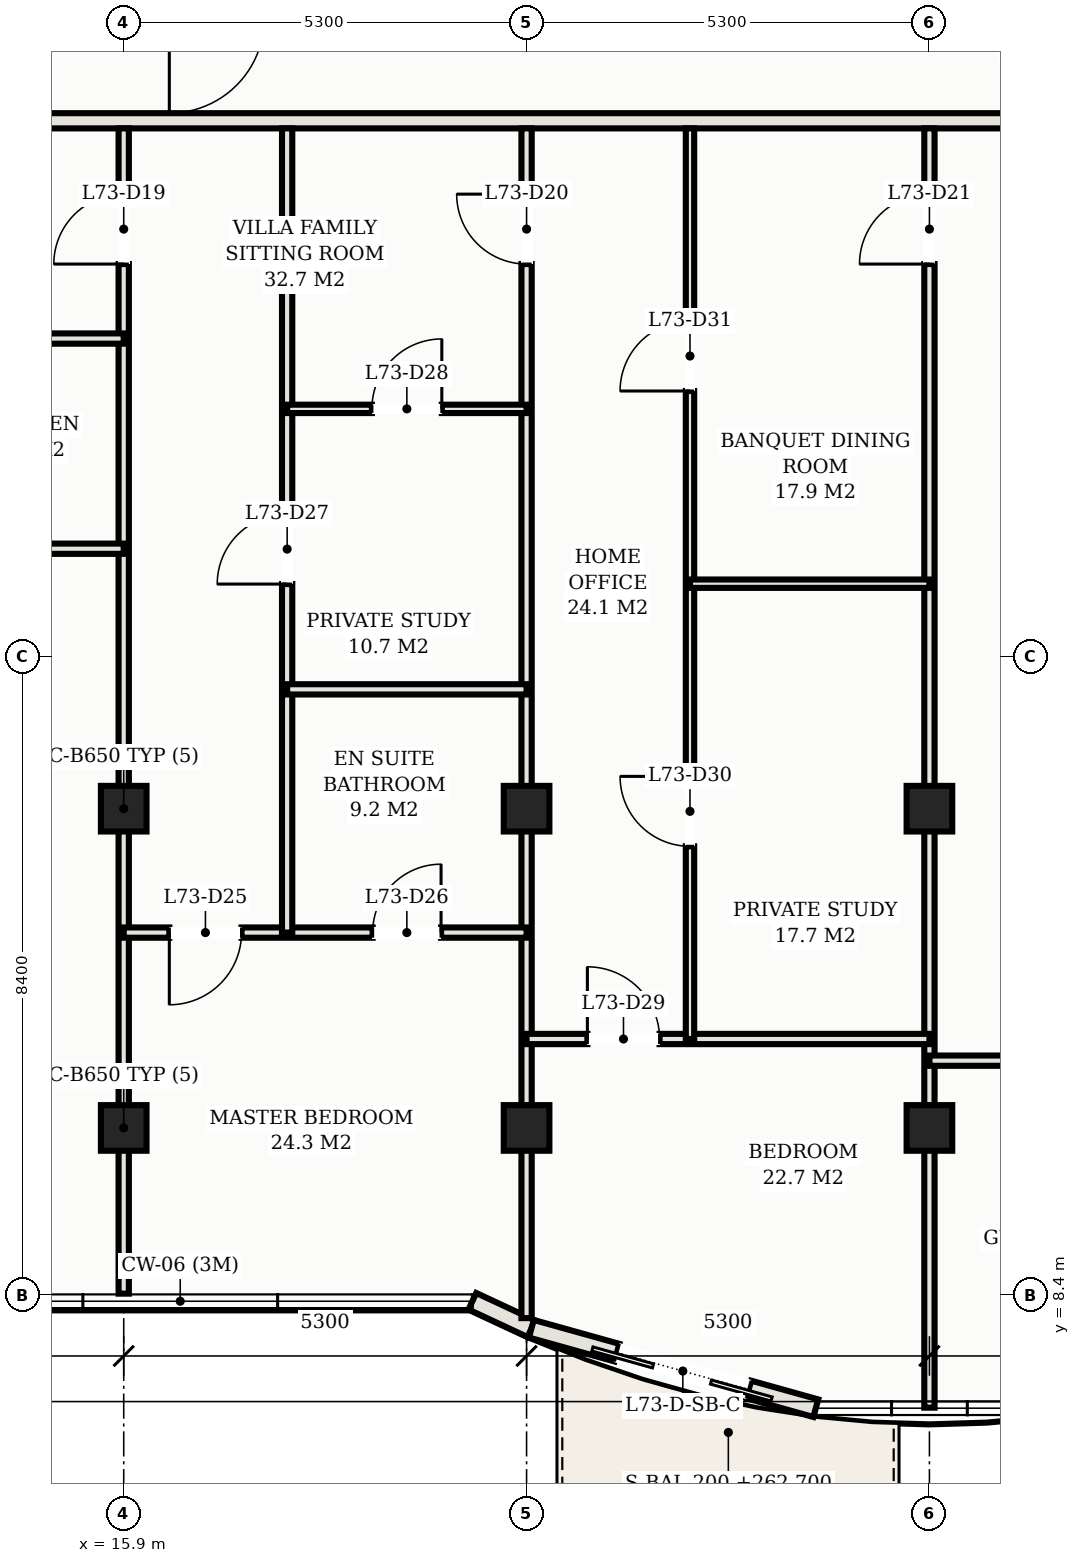
"""IFC4 building model, lengths in metres.
Left out: names, types, materials, properties, quantities, classifications, styles, units other than length and angle.
Written with IfcOpenShell. Run it as: python <this file> out.ifc"""

import sys

from ifc_helpers import new_model, si_unit, direction, frame, frame_2d, origin, origin_2d, place, context, subcontext, project, spatial, rectangle, hollow_rectangle, extrude, element, fill, save


model = new_model("IFC4")
c1 = context("Model", 3, precision=1e-05, world=origin(), true_north=direction((0.0, 1.0)))
c2 = subcontext(c1, "Body", "Model", "MODEL_VIEW")
j1 = project(units=[si_unit("LENGTHUNIT", "METRE"), si_unit("PLANEANGLEUNIT", "RADIAN")], contexts=[c1])
p1 = place(None, origin())
s1 = spatial("IfcSite", under=j1, at=p1, CompositionType="ELEMENT")
p2 = place(p1, origin())
s2 = spatial("IfcBuilding", under=s1, at=p2, CompositionType="ELEMENT")
p3 = place(p2, frame((0.0, 0.0, 262.7)))
s3 = spatial("IfcBuildingStorey", under=s2, at=p3, CompositionType="ELEMENT", Elevation=262.7)
p4 = place(p3, frame((15.9, 14.8, 0.0), z_axis=(0.0, 0.0, 1.0), x_axis=(1.0, 0.0, 0.0)))
e1 = element("IfcColumn", 1, at=p4, inside=s3, PredefinedType="COLUMN", context=c2, shape_type="SweptSolid", body=[
    extrude(hollow_rectangle(XDim=0.6, YDim=0.6, WallThickness=0.022, at=origin_2d()), origin(), (0.0, 0.0, 1.0), 3.3),
])
p5 = place(p3, frame((15.9, 10.6, 0.0), z_axis=(0.0, 0.0, 1.0), x_axis=(1.0, 0.0, 0.0)))
e2 = element("IfcColumn", 2, at=p5, inside=s3, PredefinedType="COLUMN", context=c2, shape_type="SweptSolid", body=[
    extrude(hollow_rectangle(XDim=0.6, YDim=0.6, WallThickness=0.022, at=origin_2d()), origin(), (0.0, 0.0, 1.0), 3.264),
])
p6 = place(p3, frame((21.2, 14.8, 0.0), z_axis=(0.0, 0.0, 1.0), x_axis=(1.0, 0.0, 0.0)))
e3 = element("IfcColumn", 3, at=p6, inside=s3, PredefinedType="COLUMN", context=c2, shape_type="SweptSolid", body=[
    extrude(hollow_rectangle(XDim=0.6, YDim=0.6, WallThickness=0.022, at=origin_2d()), origin(), (0.0, 0.0, 1.0), 3.3),
])
p7 = place(p3, frame((21.2, 10.6, 0.0), z_axis=(0.0, 0.0, 1.0), x_axis=(1.0, 0.0, 0.0)))
e4 = element("IfcColumn", 4, at=p7, inside=s3, PredefinedType="COLUMN", context=c2, shape_type="SweptSolid", body=[
    extrude(hollow_rectangle(XDim=0.6, YDim=0.6, WallThickness=0.022, at=origin_2d()), origin(), (0.0, 0.0, 1.0), 3.264),
])
p8 = place(p3, frame((26.5, 14.8, 0.0), z_axis=(0.0, 0.0, 1.0), x_axis=(1.0, 0.0, 0.0)))
e5 = element("IfcColumn", 5, at=p8, inside=s3, PredefinedType="COLUMN", context=c2, shape_type="SweptSolid", body=[
    extrude(hollow_rectangle(XDim=0.6, YDim=0.6, WallThickness=0.022, at=origin_2d()), origin(), (0.0, 0.0, 1.0), 3.3),
])
p9 = place(p3, frame((26.5, 10.6, 0.0), z_axis=(0.0, 0.0, 1.0), x_axis=(1.0, 0.0, 0.0)))
e6 = element("IfcColumn", 6, at=p9, inside=s3, PredefinedType="COLUMN", context=c2, shape_type="SweptSolid", body=[
    extrude(hollow_rectangle(XDim=0.6, YDim=0.6, WallThickness=0.022, at=origin_2d()), origin(), (0.0, 0.0, 1.0), 3.264),
])
p10 = place(p3, frame((20.487, 8.32, 0.0), z_axis=(0.0, 0.0, 1.0), x_axis=(0.906190424584, -0.422869855147, 0.0)))
e7 = element("IfcWall", 7, at=p10, inside=s3, PredefinedType="SOLIDWALL", context=c2, shape_type="SweptSolid", body=[
    extrude(rectangle(XDim=0.856, YDim=0.24, at=frame_2d((0.428, 0.0))), origin(), (0.0, 0.0, 1.0), 3.04),
])
p11 = place(p3, frame((21.263, 7.958, 0.0), z_axis=(0.0, 0.0, 1.0), x_axis=(0.963152398068, -0.268956238255, 0.0)))
e8 = element("IfcWall", 8, at=p11, inside=s3, PredefinedType="SOLIDWALL", context=c2, shape_type="SweptSolid", body=[
    extrude(rectangle(XDim=3.885, YDim=0.24, at=frame_2d((1.942, 0.0))), origin(), (0.0, 0.0, 1.0), 3.04),
])
p12 = place(p11, frame((1.169, 0.0, 0.0)))
e9 = element("IfcOpeningElement", 9, at=p12, cuts=e8, PredefinedType="OPENING", context=c2, shape_type="SweptSolid", body=[
    extrude(rectangle(XDim=1.8, YDim=2.2, at=frame_2d((0.9, 1.1))), frame((0.0, 0.13, 0.0), z_axis=(0.0, -1.0, 0.0), x_axis=(1.0, 0.0, 0.0)), (0.0, 0.0, 1.0), 0.26),
])
p13 = place(p3, frame((8.6, 23.85, 0.0), z_axis=(0.0, 0.0, 1.0), x_axis=(1.0, 0.0, 0.0)))
e10 = element("IfcWall", 10, at=p13, inside=s3, PredefinedType="PARTITIONING", context=c2, shape_type="SweptSolid", body=[
    extrude(rectangle(XDim=35.8, YDim=0.2, at=frame_2d((17.9, 0.0))), origin(), (0.0, 0.0, 1.0), 2.38),
])
p14 = place(p13, frame((2.625, 0.0, 0.0)))
e11 = element("IfcOpeningElement", 11, at=p14, cuts=e10, PredefinedType="OPENING", context=c2, shape_type="SweptSolid", body=[
    extrude(rectangle(XDim=1.35, YDim=2.26, at=frame_2d((0.675, 1.13))), frame((0.0, 0.11, 0.0), z_axis=(0.0, -1.0, 0.0), x_axis=(1.0, 0.0, 0.0)), (0.0, 0.0, 1.0), 0.22),
])
p15 = place(p13, frame((0.505, 0.0, 0.0)))
e12 = element("IfcOpeningElement", 12, at=p15, cuts=e10, PredefinedType="OPENING", context=c2, shape_type="SweptSolid", body=[
    extrude(rectangle(XDim=0.9, YDim=2.15, at=frame_2d((0.45, 1.075))), frame((0.0, 0.11, 0.0), z_axis=(0.0, -1.0, 0.0), x_axis=(1.0, 0.0, 0.0)), (0.0, 0.0, 1.0), 0.22),
])
p16 = place(p13, frame((34.395, 0.0, 0.0)))
e13 = element("IfcOpeningElement", 13, at=p16, cuts=e10, PredefinedType="OPENING", context=c2, shape_type="SweptSolid", body=[
    extrude(rectangle(XDim=0.9, YDim=2.15, at=frame_2d((0.45, 1.075))), frame((0.0, 0.11, 0.0), z_axis=(0.0, -1.0, 0.0), x_axis=(1.0, 0.0, 0.0)), (0.0, 0.0, 1.0), 0.22),
])
p17 = place(p3, frame((15.9, 8.42, 0.0), z_axis=(0.0, 0.0, 1.0), x_axis=(0.0, 1.0, 0.0)))
e14 = element("IfcWall", 14, at=p17, inside=s3, PredefinedType="PARTITIONING", context=c2, shape_type="SweptSolid", body=[
    extrude(rectangle(XDim=15.33, YDim=0.135, at=frame_2d((7.665, 0.0))), origin(), (0.0, 0.0, 1.0), 2.38),
])
p18 = place(p17, frame((13.545, 0.0, 0.0)))
e15 = element("IfcOpeningElement", 15, at=p18, cuts=e14, PredefinedType="OPENING", context=c2, shape_type="SweptSolid", body=[
    extrude(rectangle(XDim=0.92, YDim=2.15, at=frame_2d((0.46, 1.075))), frame((0.0, 0.078, 0.0), z_axis=(0.0, -1.0, 0.0), x_axis=(1.0, 0.0, 0.0)), (0.0, 0.0, 1.0), 0.155),
])
p19 = place(p3, frame((21.2, 8.098, 0.0), z_axis=(0.0, 0.0, 1.0), x_axis=(0.0, 1.0, 0.0)))
e16 = element("IfcWall", 16, at=p19, inside=s3, PredefinedType="PARTITIONING", context=c2, shape_type="SweptSolid", body=[
    extrude(rectangle(XDim=15.652, YDim=0.135, at=frame_2d((7.826, 0.0))), origin(), (0.0, 0.0, 1.0), 2.38),
])
p20 = place(p19, frame((13.867, 0.0, 0.0)))
e17 = element("IfcOpeningElement", 17, at=p20, cuts=e16, PredefinedType="OPENING", context=c2, shape_type="SweptSolid", body=[
    extrude(rectangle(XDim=0.92, YDim=2.15, at=frame_2d((0.46, 1.075))), frame((0.0, 0.078, 0.0), z_axis=(0.0, -1.0, 0.0), x_axis=(1.0, 0.0, 0.0)), (0.0, 0.0, 1.0), 0.155),
])
p21 = place(p3, frame((26.5, 6.92, 0.0), z_axis=(0.0, 0.0, 1.0), x_axis=(0.0, 1.0, 0.0)))
e18 = element("IfcWall", 18, at=p21, inside=s3, PredefinedType="PARTITIONING", context=c2, shape_type="SweptSolid", body=[
    extrude(rectangle(XDim=16.83, YDim=0.135, at=frame_2d((8.415, 0.0))), origin(), (0.0, 0.0, 1.0), 2.38),
])
p22 = place(p21, frame((15.045, 0.0, 0.0)))
e19 = element("IfcOpeningElement", 19, at=p22, cuts=e18, PredefinedType="OPENING", context=c2, shape_type="SweptSolid", body=[
    extrude(rectangle(XDim=0.92, YDim=2.15, at=frame_2d((0.46, 1.075))), frame((0.0, 0.078, 0.0), z_axis=(0.0, -1.0, 0.0), x_axis=(1.0, 0.0, 0.0)), (0.0, 0.0, 1.0), 0.155),
])
for number, where, z_axis, x_axis in (
    (20, (12.75, 18.22, 0.0), (0.0, 0.0, 1.0), (1.0, 0.0, 0.0)),
    (21, (12.75, 20.985, 0.0), (0.0, 0.0, 1.0), (1.0, 0.0, 0.0)),
):
    element("IfcWall", number, at=place(p3, frame(where, z_axis=z_axis, x_axis=x_axis)), inside=s3, PredefinedType="PARTITIONING", context=c2, shape_type="SweptSolid", body=[
        extrude(rectangle(XDim=3.15, YDim=0.135, at=frame_2d((1.575, 0.0))), origin(), (0.0, 0.0, 1.0), 2.38),
    ])
p23 = place(p3, frame((15.9, 13.17, 0.0), z_axis=(0.0, 0.0, 1.0), x_axis=(1.0, 0.0, 0.0)))
e22 = element("IfcWall", 22, at=p23, inside=s3, PredefinedType="PARTITIONING", context=c2, shape_type="SweptSolid", body=[
    extrude(rectangle(XDim=5.3, YDim=0.135, at=frame_2d((2.65, 0.0))), origin(), (0.0, 0.0, 1.0), 2.38),
])
p24 = place(p23, frame((0.6, 0.0, 0.0)))
e23 = element("IfcOpeningElement", 23, at=p24, cuts=e22, PredefinedType="OPENING", context=c2, shape_type="SweptSolid", body=[
    extrude(rectangle(XDim=0.95, YDim=2.15, at=frame_2d((0.475, 1.075))), frame((0.0, 0.078, 0.0), z_axis=(0.0, -1.0, 0.0), x_axis=(1.0, 0.0, 0.0)), (0.0, 0.0, 1.0), 0.155),
])
p25 = place(p23, frame((3.275, 0.0, 0.0)))
e24 = element("IfcOpeningElement", 24, at=p25, cuts=e22, PredefinedType="OPENING", context=c2, shape_type="SweptSolid", body=[
    extrude(rectangle(XDim=0.9, YDim=2.15, at=frame_2d((0.45, 1.075))), frame((0.0, 0.078, 0.0), z_axis=(0.0, -1.0, 0.0), x_axis=(1.0, 0.0, 0.0)), (0.0, 0.0, 1.0), 0.155),
])
p26 = place(p3, frame((18.05, 13.17, 0.0), z_axis=(0.0, 0.0, 1.0), x_axis=(0.0, 1.0, 0.0)))
e25 = element("IfcWall", 25, at=p26, inside=s3, PredefinedType="PARTITIONING", context=c2, shape_type="SweptSolid", body=[
    extrude(rectangle(XDim=10.58, YDim=0.135, at=frame_2d((5.29, 0.0))), origin(), (0.0, 0.0, 1.0), 2.38),
])
p27 = place(p26, frame((4.585, 0.0, 0.0)))
e26 = element("IfcOpeningElement", 26, at=p27, cuts=e25, PredefinedType="OPENING", context=c2, shape_type="SweptSolid", body=[
    extrude(rectangle(XDim=0.92, YDim=2.15, at=frame_2d((0.46, 1.075))), frame((0.0, 0.078, 0.0), z_axis=(0.0, -1.0, 0.0), x_axis=(1.0, 0.0, 0.0)), (0.0, 0.0, 1.0), 0.155),
])
p28 = place(p3, frame((18.05, 16.37, 0.0), z_axis=(0.0, 0.0, 1.0), x_axis=(1.0, 0.0, 0.0)))
e27 = element("IfcWall", 27, at=p28, inside=s3, PredefinedType="PARTITIONING", context=c2, shape_type="SweptSolid", body=[
    extrude(rectangle(XDim=3.15, YDim=0.135, at=frame_2d((1.575, 0.0))), origin(), (0.0, 0.0, 1.0), 2.38),
])
p29 = place(p3, frame((18.05, 20.06, 0.0), z_axis=(0.0, 0.0, 1.0), x_axis=(1.0, 0.0, 0.0)))
e28 = element("IfcWall", 28, at=p29, inside=s3, PredefinedType="MOVABLE", context=c2, shape_type="SweptSolid", body=[
    extrude(rectangle(XDim=3.15, YDim=0.11, at=frame_2d((1.575, 0.0))), origin(), (0.0, 0.0, 1.0), 2.38),
])
p30 = place(p29, frame((1.115, 0.0, 0.0)))
e29 = element("IfcOpeningElement", 29, at=p30, cuts=e28, PredefinedType="OPENING", context=c2, shape_type="SweptSolid", body=[
    extrude(rectangle(XDim=0.92, YDim=2.15, at=frame_2d((0.46, 1.075))), frame((0.0, 0.065, 0.0), z_axis=(0.0, -1.0, 0.0), x_axis=(1.0, 0.0, 0.0)), (0.0, 0.0, 1.0), 0.13),
])
p31 = place(p3, frame((21.2, 11.77, 0.0), z_axis=(0.0, 0.0, 1.0), x_axis=(1.0, 0.0, 0.0)))
e30 = element("IfcWall", 30, at=p31, inside=s3, PredefinedType="PARTITIONING", context=c2, shape_type="SweptSolid", body=[
    extrude(rectangle(XDim=5.3, YDim=0.135, at=frame_2d((2.65, 0.0))), origin(), (0.0, 0.0, 1.0), 2.38),
])
p32 = place(p31, frame((0.8, 0.0, 0.0)))
e31 = element("IfcOpeningElement", 31, at=p32, cuts=e30, PredefinedType="OPENING", context=c2, shape_type="SweptSolid", body=[
    extrude(rectangle(XDim=0.95, YDim=2.15, at=frame_2d((0.475, 1.075))), frame((0.0, 0.078, 0.0), z_axis=(0.0, -1.0, 0.0), x_axis=(1.0, 0.0, 0.0)), (0.0, 0.0, 1.0), 0.155),
])
p33 = place(p3, frame((23.35, 11.77, 0.0), z_axis=(0.0, 0.0, 1.0), x_axis=(0.0, 1.0, 0.0)))
e32 = element("IfcWall", 32, at=p33, inside=s3, PredefinedType="MOVABLE", context=c2, shape_type="SweptSolid", body=[
    extrude(rectangle(XDim=11.98, YDim=0.11, at=frame_2d((5.99, 0.0))), origin(), (0.0, 0.0, 1.0), 2.38),
])
p34 = place(p33, frame((2.535, 0.0, 0.0)))
e33 = element("IfcOpeningElement", 33, at=p34, cuts=e32, PredefinedType="OPENING", context=c2, shape_type="SweptSolid", body=[
    extrude(rectangle(XDim=0.92, YDim=2.15, at=frame_2d((0.46, 1.075))), frame((0.0, 0.065, 0.0), z_axis=(0.0, -1.0, 0.0), x_axis=(1.0, 0.0, 0.0)), (0.0, 0.0, 1.0), 0.13),
])
p35 = place(p33, frame((8.525, 0.0, 0.0)))
e34 = element("IfcOpeningElement", 34, at=p35, cuts=e32, PredefinedType="OPENING", context=c2, shape_type="SweptSolid", body=[
    extrude(rectangle(XDim=0.92, YDim=2.15, at=frame_2d((0.46, 1.075))), frame((0.0, 0.065, 0.0), z_axis=(0.0, -1.0, 0.0), x_axis=(1.0, 0.0, 0.0)), (0.0, 0.0, 1.0), 0.13),
])
p36 = place(p3, frame((23.35, 17.76, 0.0), z_axis=(0.0, 0.0, 1.0), x_axis=(1.0, 0.0, 0.0)))
e35 = element("IfcWall", 35, at=p36, inside=s3, PredefinedType="MOVABLE", context=c2, shape_type="SweptSolid", body=[
    extrude(rectangle(XDim=3.15, YDim=0.11, at=frame_2d((1.575, 0.0))), origin(), (0.0, 0.0, 1.0), 2.38),
])
p37 = place(p3, frame((26.5, 11.485, 0.0), z_axis=(0.0, 0.0, 1.0), x_axis=(1.0, 0.0, 0.0)))
e36 = element("IfcWall", 36, at=p37, inside=s3, PredefinedType="PARTITIONING", context=c2, shape_type="SweptSolid", body=[
    extrude(rectangle(XDim=9.3, YDim=0.135, at=frame_2d((4.65, 0.0))), origin(), (0.0, 0.0, 1.0), 2.38),
])
p38 = place(p37, frame((2.375, 0.0, 0.0)))
e37 = element("IfcOpeningElement", 37, at=p38, cuts=e36, PredefinedType="OPENING", context=c2, shape_type="SweptSolid", body=[
    extrude(rectangle(XDim=0.95, YDim=2.15, at=frame_2d((0.475, 1.075))), frame((0.0, 0.078, 0.0), z_axis=(0.0, -1.0, 0.0), x_axis=(1.0, 0.0, 0.0)), (0.0, 0.0, 1.0), 0.155),
])
p39 = place(p12, frame((1.8, 0.0, 0.0), z_axis=(0.0, 0.0, 1.0), x_axis=(-1.0, 0.0, 0.0)))
e38 = element("IfcDoor", 38, at=p39, inside=s3, OperationType="DOUBLE_DOOR_SLIDING", PredefinedType="DOOR", context=c2, shape_type="SweptSolid", body=[
    extrude(rectangle(XDim=1.8, YDim=2.2, at=frame_2d((0.9, 1.1))), frame((0.0, 0.025, 0.0), z_axis=(0.0, -1.0, 0.0), x_axis=(1.0, 0.0, 0.0)), (0.0, 0.0, 1.0), 0.05),
])
fill(e9, e38)
p40 = place(p18, origin())
e39 = element("IfcDoor", 39, at=p40, inside=s3, OperationType="SINGLE_SWING_LEFT", PredefinedType="DOOR", context=c2, shape_type="SweptSolid", body=[
    extrude(rectangle(XDim=0.92, YDim=2.15, at=frame_2d((0.46, 1.075))), frame((0.0, 0.025, 0.0), z_axis=(0.0, -1.0, 0.0), x_axis=(1.0, 0.0, 0.0)), (0.0, 0.0, 1.0), 0.05),
])
fill(e15, e39)
p41 = place(p20, origin())
e40 = element("IfcDoor", 40, at=p41, inside=s3, OperationType="SINGLE_SWING_RIGHT", PredefinedType="DOOR", context=c2, shape_type="SweptSolid", body=[
    extrude(rectangle(XDim=0.92, YDim=2.15, at=frame_2d((0.46, 1.075))), frame((0.0, 0.025, 0.0), z_axis=(0.0, -1.0, 0.0), x_axis=(1.0, 0.0, 0.0)), (0.0, 0.0, 1.0), 0.05),
])
fill(e17, e40)
p42 = place(p22, origin())
e41 = element("IfcDoor", 41, at=p42, inside=s3, OperationType="SINGLE_SWING_LEFT", PredefinedType="DOOR", context=c2, shape_type="SweptSolid", body=[
    extrude(rectangle(XDim=0.92, YDim=2.15, at=frame_2d((0.46, 1.075))), frame((0.0, 0.025, 0.0), z_axis=(0.0, -1.0, 0.0), x_axis=(1.0, 0.0, 0.0)), (0.0, 0.0, 1.0), 0.05),
])
fill(e19, e41)
p43 = place(p24, frame((0.95, 0.0, 0.0), z_axis=(0.0, 0.0, 1.0), x_axis=(-1.0, 0.0, 0.0)))
e42 = element("IfcDoor", 42, at=p43, inside=s3, OperationType="SINGLE_SWING_RIGHT", PredefinedType="DOOR", context=c2, shape_type="SweptSolid", body=[
    extrude(rectangle(XDim=0.95, YDim=2.15, at=frame_2d((0.475, 1.075))), frame((0.0, 0.025, 0.0), z_axis=(0.0, -1.0, 0.0), x_axis=(1.0, 0.0, 0.0)), (0.0, 0.0, 1.0), 0.05),
])
fill(e23, e42)
p44 = place(p25, origin())
e43 = element("IfcDoor", 43, at=p44, inside=s3, OperationType="SINGLE_SWING_RIGHT", PredefinedType="DOOR", context=c2, shape_type="SweptSolid", body=[
    extrude(rectangle(XDim=0.9, YDim=2.15, at=frame_2d((0.45, 1.075))), frame((0.0, 0.025, 0.0), z_axis=(0.0, -1.0, 0.0), x_axis=(1.0, 0.0, 0.0)), (0.0, 0.0, 1.0), 0.05),
])
fill(e24, e43)
p45 = place(p27, origin())
e44 = element("IfcDoor", 44, at=p45, inside=s3, OperationType="SINGLE_SWING_LEFT", PredefinedType="DOOR", context=c2, shape_type="SweptSolid", body=[
    extrude(rectangle(XDim=0.92, YDim=2.15, at=frame_2d((0.46, 1.075))), frame((0.0, 0.025, 0.0), z_axis=(0.0, -1.0, 0.0), x_axis=(1.0, 0.0, 0.0)), (0.0, 0.0, 1.0), 0.05),
])
fill(e26, e44)
p46 = place(p30, origin())
e45 = element("IfcDoor", 45, at=p46, inside=s3, OperationType="SINGLE_SWING_RIGHT", PredefinedType="DOOR", context=c2, shape_type="SweptSolid", body=[
    extrude(rectangle(XDim=0.92, YDim=2.15, at=frame_2d((0.46, 1.075))), frame((0.0, 0.025, 0.0), z_axis=(0.0, -1.0, 0.0), x_axis=(1.0, 0.0, 0.0)), (0.0, 0.0, 1.0), 0.05),
])
fill(e29, e45)
p47 = place(p32, origin())
e46 = element("IfcDoor", 46, at=p47, inside=s3, OperationType="SINGLE_SWING_LEFT", PredefinedType="DOOR", context=c2, shape_type="SweptSolid", body=[
    extrude(rectangle(XDim=0.95, YDim=2.15, at=frame_2d((0.475, 1.075))), frame((0.0, 0.025, 0.0), z_axis=(0.0, -1.0, 0.0), x_axis=(1.0, 0.0, 0.0)), (0.0, 0.0, 1.0), 0.05),
])
fill(e31, e46)
p48 = place(p34, origin())
e47 = element("IfcDoor", 47, at=p48, inside=s3, OperationType="SINGLE_SWING_RIGHT", PredefinedType="DOOR", context=c2, shape_type="SweptSolid", body=[
    extrude(rectangle(XDim=0.92, YDim=2.15, at=frame_2d((0.46, 1.075))), frame((0.0, 0.025, 0.0), z_axis=(0.0, -1.0, 0.0), x_axis=(1.0, 0.0, 0.0)), (0.0, 0.0, 1.0), 0.05),
])
fill(e33, e47)
p49 = place(p35, origin())
e48 = element("IfcDoor", 48, at=p49, inside=s3, OperationType="SINGLE_SWING_LEFT", PredefinedType="DOOR", context=c2, shape_type="SweptSolid", body=[
    extrude(rectangle(XDim=0.92, YDim=2.15, at=frame_2d((0.46, 1.075))), frame((0.0, 0.025, 0.0), z_axis=(0.0, -1.0, 0.0), x_axis=(1.0, 0.0, 0.0)), (0.0, 0.0, 1.0), 0.05),
])
fill(e34, e48)
save(model, sys.argv[1])
